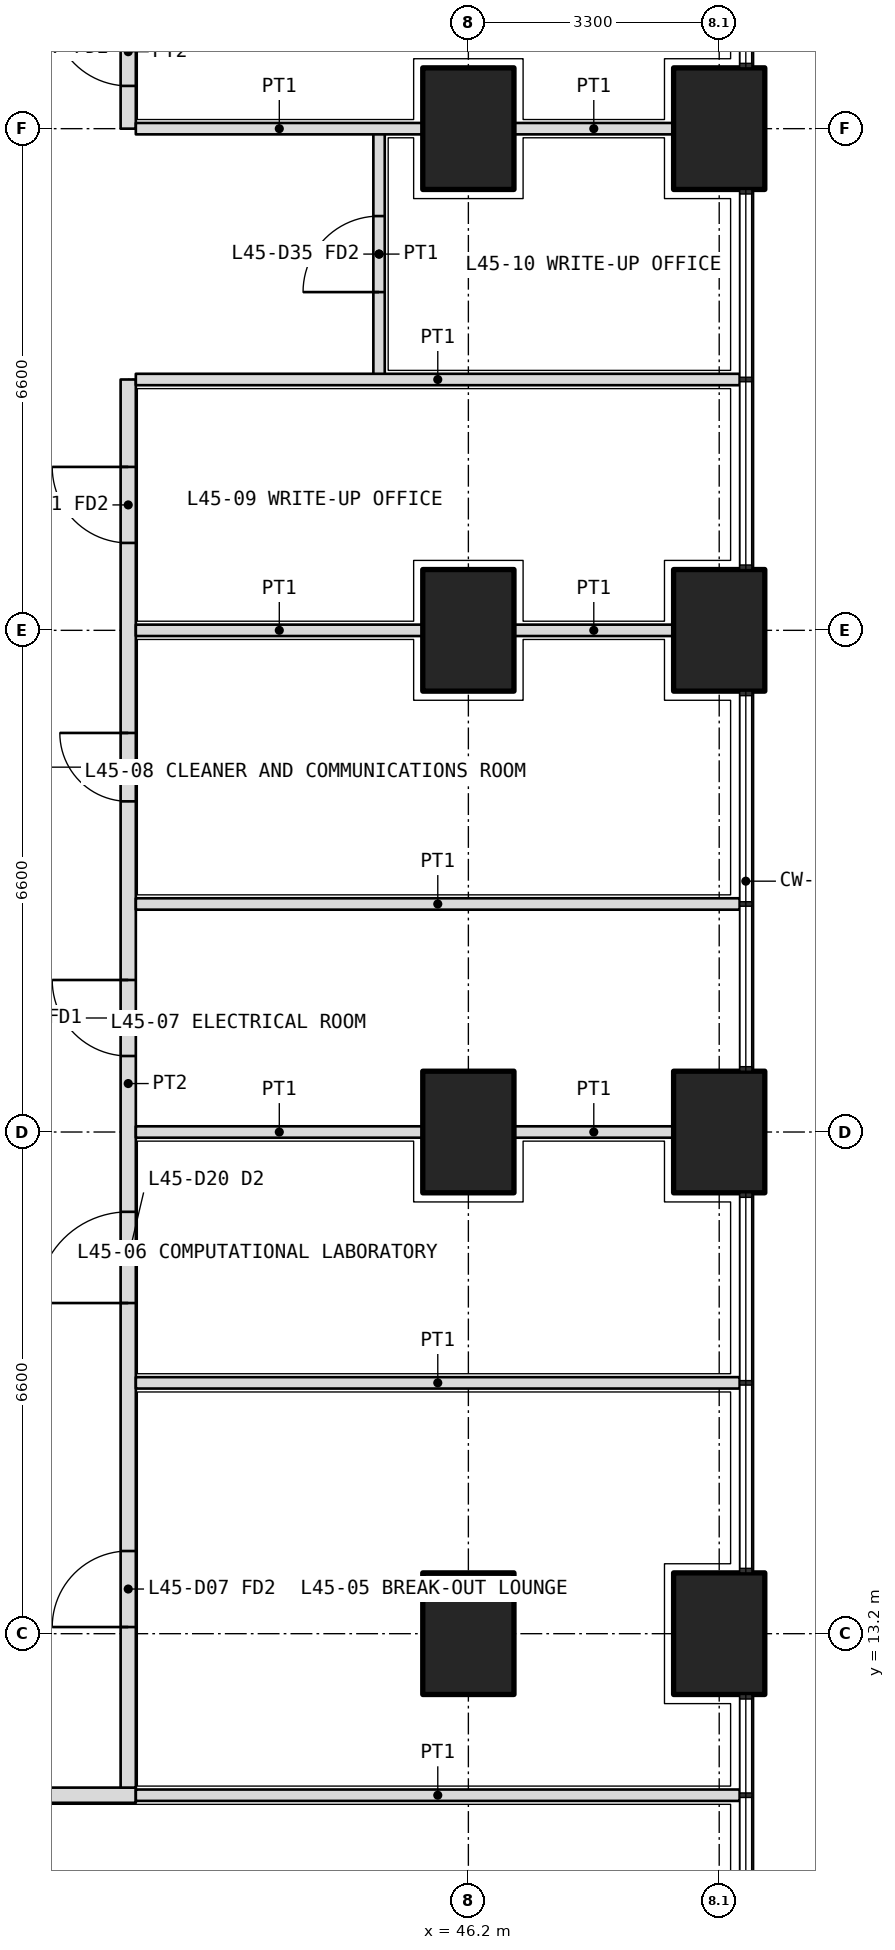
"""IFC4 building model, lengths in metres.
Left out: names, types, materials, properties, quantities, classifications, styles, units other than length and angle.
Written with IfcOpenShell. Run it as: python <this file> out.ifc"""

import sys

from ifc_helpers import new_model, si_unit, direction, frame, frame_2d, origin, origin_2d, place, context, subcontext, project, spatial, rectangle, extrude, element, fill, save


model = new_model("IFC4")
c1 = context("Model", 3, precision=1e-05, world=origin(), true_north=direction((0.0, 1.0)))
c2 = subcontext(c1, "Body", "Model", "MODEL_VIEW")
j1 = project(units=[si_unit("LENGTHUNIT", "METRE"), si_unit("PLANEANGLEUNIT", "RADIAN")], contexts=[c1])
p1 = place(None, origin())
s1 = spatial("IfcSite", under=j1, at=p1, CompositionType="ELEMENT")
p2 = place(p1, origin())
s2 = spatial("IfcBuilding", under=s1, at=p2, CompositionType="ELEMENT")
p3 = place(p2, frame((0.0, 0.0, 197.7)))
s3 = spatial("IfcBuildingStorey", under=s2, at=p3, CompositionType="ELEMENT", Elevation=197.7)
for number, where, z_axis, x_axis in (
    (1, (49.5, 13.2, 0.0), (0.0, 0.0, 1.0), (0.0, 1.0, 0.0)),
    (2, (49.5, 19.8, 0.0), (0.0, 0.0, 1.0), (0.0, 1.0, 0.0)),
    (3, (49.5, 26.4, 0.0), (0.0, 0.0, 1.0), (0.0, 1.0, 0.0)),
    (4, (49.5, 33.0, 0.0), (0.0, 0.0, 1.0), (0.0, 1.0, 0.0)),
    (5, (46.2, 13.2, 0.0), (0.0, 0.0, 1.0), (0.0, 1.0, 0.0)),
    (6, (46.2, 19.8, 0.0), (0.0, 0.0, 1.0), (0.0, 1.0, 0.0)),
    (7, (46.2, 26.4, 0.0), (0.0, 0.0, 1.0), (0.0, 1.0, 0.0)),
    (8, (46.2, 33.0, 0.0), (0.0, 0.0, 1.0), (0.0, 1.0, 0.0)),
):
    element("IfcColumn", number, at=place(p3, frame(where, z_axis=z_axis, x_axis=x_axis)), inside=s3, PredefinedType="COLUMN", context=c2, shape_type="SweptSolid", body=[
        extrude(rectangle(XDim=1.6, YDim=1.2, at=origin_2d()), origin(), (0.0, 0.0, 1.0), 4.2),
    ])
p4 = place(p3, frame((10.975, 11.075, 0.0), z_axis=(0.0, 0.0, 1.0), x_axis=(1.0, 0.0, 0.0)))
e9 = element("IfcWall", 9, at=p4, inside=s3, PredefinedType="PARTITIONING", context=c2, shape_type="SweptSolid", body=[
    extrude(rectangle(XDim=30.85, YDim=0.2, at=frame_2d((15.425, 0.0))), origin(), (0.0, 0.0, 1.0), 2.85),
])
p5 = place(p4, frame((5.512, 0.0, 0.0)))
e10 = element("IfcOpeningElement", 10, at=p5, cuts=e9, PredefinedType="OPENING", context=c2, shape_type="SweptSolid", body=[
    extrude(rectangle(XDim=1.2, YDim=2.1, at=frame_2d((0.6, 1.05))), frame((0.0, 0.11, 0.0), z_axis=(0.0, -1.0, 0.0), x_axis=(1.0, 0.0, 0.0)), (0.0, 0.0, 1.0), 0.22),
])
p6 = place(p4, frame((13.375, 0.0, 0.0)))
e11 = element("IfcOpeningElement", 11, at=p6, cuts=e9, PredefinedType="OPENING", context=c2, shape_type="SweptSolid", body=[
    extrude(rectangle(XDim=1.0, YDim=2.1, at=frame_2d((0.5, 1.05))), frame((0.0, 0.11, 0.0), z_axis=(0.0, -1.0, 0.0), x_axis=(1.0, 0.0, 0.0)), (0.0, 0.0, 1.0), 0.22),
])
p7 = place(p4, frame((16.675, 0.0, 0.0)))
e12 = element("IfcOpeningElement", 12, at=p7, cuts=e9, PredefinedType="OPENING", context=c2, shape_type="SweptSolid", body=[
    extrude(rectangle(XDim=1.0, YDim=2.1, at=frame_2d((0.5, 1.05))), frame((0.0, 0.11, 0.0), z_axis=(0.0, -1.0, 0.0), x_axis=(1.0, 0.0, 0.0)), (0.0, 0.0, 1.0), 0.22),
])
p8 = place(p4, frame((24.238, 0.0, 0.0)))
e13 = element("IfcOpeningElement", 13, at=p8, cuts=e9, PredefinedType="OPENING", context=c2, shape_type="SweptSolid", body=[
    extrude(rectangle(XDim=1.0, YDim=2.1, at=frame_2d((0.5, 1.05))), frame((0.0, 0.11, 0.0), z_axis=(0.0, -1.0, 0.0), x_axis=(1.0, 0.0, 0.0)), (0.0, 0.0, 1.0), 0.22),
])
p9 = place(p3, frame((41.725, 11.175, 0.0), z_axis=(0.0, 0.0, 1.0), x_axis=(0.0, 1.0, 0.0)))
e14 = element("IfcWall", 14, at=p9, inside=s3, PredefinedType="PARTITIONING", context=c2, shape_type="SweptSolid", body=[
    extrude(rectangle(XDim=18.525, YDim=0.2, at=frame_2d((9.262, 0.0))), origin(), (0.0, 0.0, 1.0), 2.85),
])
p10 = place(p9, frame((2.113, 0.0, 0.0)))
e15 = element("IfcOpeningElement", 15, at=p10, cuts=e14, PredefinedType="OPENING", context=c2, shape_type="SweptSolid", body=[
    extrude(rectangle(XDim=1.0, YDim=2.1, at=frame_2d((0.5, 1.05))), frame((0.0, 0.11, 0.0), z_axis=(0.0, -1.0, 0.0), x_axis=(1.0, 0.0, 0.0)), (0.0, 0.0, 1.0), 0.22),
])
p11 = place(p9, frame((6.375, 0.0, 0.0)))
e16 = element("IfcOpeningElement", 16, at=p11, cuts=e14, PredefinedType="OPENING", context=c2, shape_type="SweptSolid", body=[
    extrude(rectangle(XDim=1.2, YDim=2.1, at=frame_2d((0.6, 1.05))), frame((0.0, 0.11, 0.0), z_axis=(0.0, -1.0, 0.0), x_axis=(1.0, 0.0, 0.0)), (0.0, 0.0, 1.0), 0.22),
])
p12 = place(p9, frame((9.625, 0.0, 0.0)))
e17 = element("IfcOpeningElement", 17, at=p12, cuts=e14, PredefinedType="OPENING", context=c2, shape_type="SweptSolid", body=[
    extrude(rectangle(XDim=1.0, YDim=2.1, at=frame_2d((0.5, 1.05))), frame((0.0, 0.11, 0.0), z_axis=(0.0, -1.0, 0.0), x_axis=(1.0, 0.0, 0.0)), (0.0, 0.0, 1.0), 0.22),
])
p13 = place(p9, frame((12.975, 0.0, 0.0)))
e18 = element("IfcOpeningElement", 18, at=p13, cuts=e14, PredefinedType="OPENING", context=c2, shape_type="SweptSolid", body=[
    extrude(rectangle(XDim=0.9, YDim=2.1, at=frame_2d((0.45, 1.05))), frame((0.0, 0.11, 0.0), z_axis=(0.0, -1.0, 0.0), x_axis=(1.0, 0.0, 0.0)), (0.0, 0.0, 1.0), 0.22),
])
p14 = place(p9, frame((16.375, 0.0, 0.0)))
e19 = element("IfcOpeningElement", 19, at=p14, cuts=e14, PredefinedType="OPENING", context=c2, shape_type="SweptSolid", body=[
    extrude(rectangle(XDim=1.0, YDim=2.1, at=frame_2d((0.5, 1.05))), frame((0.0, 0.11, 0.0), z_axis=(0.0, -1.0, 0.0), x_axis=(1.0, 0.0, 0.0)), (0.0, 0.0, 1.0), 0.22),
])
p15 = place(p3, frame((41.725, 33.0, 0.0), z_axis=(0.0, 0.0, 1.0), x_axis=(0.0, 1.0, 0.0)))
e20 = element("IfcWall", 20, at=p15, inside=s3, PredefinedType="PARTITIONING", context=c2, shape_type="SweptSolid", body=[
    extrude(rectangle(XDim=2.025, YDim=0.2, at=frame_2d((1.012, 0.0))), origin(), (0.0, 0.0, 1.0), 2.85),
])
p16 = place(p15, frame((0.562, 0.0, 0.0)))
e21 = element("IfcOpeningElement", 21, at=p16, cuts=e20, PredefinedType="OPENING", context=c2, shape_type="SweptSolid", body=[
    extrude(rectangle(XDim=1.0, YDim=2.1, at=frame_2d((0.5, 1.05))), frame((0.0, 0.11, 0.0), z_axis=(0.0, -1.0, 0.0), x_axis=(1.0, 0.0, 0.0)), (0.0, 0.0, 1.0), 0.22),
])
for number, where, z_axis, x_axis in (
    (22, (49.77, 11.075, 0.0), (0.0, 0.0, 1.0), (-1.0, 0.0, 0.0)),
    (23, (49.77, 22.8, 0.0), (0.0, 0.0, 1.0), (-1.0, 0.0, 0.0)),
):
    element("IfcWall", number, at=place(p3, frame(where, z_axis=z_axis, x_axis=x_axis)), inside=s3, PredefinedType="PARTITIONING", context=c2, shape_type="SweptSolid", body=[
        extrude(rectangle(XDim=7.945, YDim=0.15, at=frame_2d((3.973, 0.0))), origin(), (0.0, 0.0, 1.0), 2.7),
    ])
p17 = place(p3, frame((48.9, 26.4, 0.0), z_axis=(0.0, 0.0, 1.0), x_axis=(-1.0, 0.0, 0.0)))
e24 = element("IfcWall", 24, at=p17, inside=s3, PredefinedType="PARTITIONING", context=c2, shape_type="SweptSolid", body=[
    extrude(rectangle(XDim=2.1, YDim=0.15, at=frame_2d((1.05, 0.0))), origin(), (0.0, 0.0, 1.0), 2.85),
])
p18 = place(p3, frame((45.6, 26.4, 0.0), z_axis=(0.0, 0.0, 1.0), x_axis=(-1.0, 0.0, 0.0)))
e25 = element("IfcWall", 25, at=p18, inside=s3, PredefinedType="PARTITIONING", context=c2, shape_type="SweptSolid", body=[
    extrude(rectangle(XDim=3.775, YDim=0.15, at=frame_2d((1.888, 0.0))), origin(), (0.0, 0.0, 1.0), 2.85),
])
p19 = place(p3, frame((45.025, 29.7, 0.0), z_axis=(0.0, 0.0, 1.0), x_axis=(0.0, 1.0, 0.0)))
e26 = element("IfcWall", 26, at=p19, inside=s3, PredefinedType="PARTITIONING", context=c2, shape_type="SweptSolid", body=[
    extrude(rectangle(XDim=3.3, YDim=0.15, at=frame_2d((1.65, 0.0))), origin(), (0.0, 0.0, 1.0), 2.85),
])
p20 = place(p19, frame((1.15, 0.0, 0.0)))
e27 = element("IfcOpeningElement", 27, at=p20, cuts=e26, PredefinedType="OPENING", context=c2, shape_type="SweptSolid", body=[
    extrude(rectangle(XDim=1.0, YDim=2.1, at=frame_2d((0.5, 1.05))), frame((0.0, 0.085, 0.0), z_axis=(0.0, -1.0, 0.0), x_axis=(1.0, 0.0, 0.0)), (0.0, 0.0, 1.0), 0.17),
])
p21 = place(p3, frame((49.77, 16.5, 0.0), z_axis=(0.0, 0.0, 1.0), x_axis=(-1.0, 0.0, 0.0)))
e28 = element("IfcWall", 28, at=p21, inside=s3, PredefinedType="PARTITIONING", context=c2, shape_type="SweptSolid", body=[
    extrude(rectangle(XDim=7.945, YDim=0.15, at=frame_2d((3.973, 0.0))), origin(), (0.0, 0.0, 1.0), 2.7),
])
p22 = place(p3, frame((48.9, 19.8, 0.0), z_axis=(0.0, 0.0, 1.0), x_axis=(-1.0, 0.0, 0.0)))
e29 = element("IfcWall", 29, at=p22, inside=s3, PredefinedType="PARTITIONING", context=c2, shape_type="SweptSolid", body=[
    extrude(rectangle(XDim=2.1, YDim=0.15, at=frame_2d((1.05, 0.0))), origin(), (0.0, 0.0, 1.0), 2.85),
])
p23 = place(p3, frame((45.6, 19.8, 0.0), z_axis=(0.0, 0.0, 1.0), x_axis=(-1.0, 0.0, 0.0)))
e30 = element("IfcWall", 30, at=p23, inside=s3, PredefinedType="PARTITIONING", context=c2, shape_type="SweptSolid", body=[
    extrude(rectangle(XDim=3.775, YDim=0.15, at=frame_2d((1.888, 0.0))), origin(), (0.0, 0.0, 1.0), 2.85),
])
p24 = place(p3, frame((49.77, 29.7, 0.0), z_axis=(0.0, 0.0, 1.0), x_axis=(-1.0, 0.0, 0.0)))
e31 = element("IfcWall", 31, at=p24, inside=s3, PredefinedType="PARTITIONING", context=c2, shape_type="SweptSolid", body=[
    extrude(rectangle(XDim=7.945, YDim=0.15, at=frame_2d((3.973, 0.0))), origin(), (0.0, 0.0, 1.0), 2.7),
])
p25 = place(p3, frame((48.9, 33.0, 0.0), z_axis=(0.0, 0.0, 1.0), x_axis=(-1.0, 0.0, 0.0)))
e32 = element("IfcWall", 32, at=p25, inside=s3, PredefinedType="PARTITIONING", context=c2, shape_type="SweptSolid", body=[
    extrude(rectangle(XDim=2.1, YDim=0.15, at=frame_2d((1.05, 0.0))), origin(), (0.0, 0.0, 1.0), 2.85),
])
p26 = place(p3, frame((45.6, 33.0, 0.0), z_axis=(0.0, 0.0, 1.0), x_axis=(-1.0, 0.0, 0.0)))
e33 = element("IfcWall", 33, at=p26, inside=s3, PredefinedType="PARTITIONING", context=c2, shape_type="SweptSolid", body=[
    extrude(rectangle(XDim=3.775, YDim=0.15, at=frame_2d((1.888, 0.0))), origin(), (0.0, 0.0, 1.0), 2.85),
])
p27 = place(p10, origin())
e34 = element("IfcDoor", 34, at=p27, inside=s3, OperationType="SINGLE_SWING_LEFT", PredefinedType="DOOR", context=c2, shape_type="SweptSolid", body=[
    extrude(rectangle(XDim=1.0, YDim=2.1, at=frame_2d((0.5, 1.05))), frame((0.0, 0.025, 0.0), z_axis=(0.0, -1.0, 0.0), x_axis=(1.0, 0.0, 0.0)), (0.0, 0.0, 1.0), 0.05),
])
fill(e15, e34)
p28 = place(p11, origin())
e35 = element("IfcDoor", 35, at=p28, inside=s3, OperationType="DOUBLE_DOOR_SINGLE_SWING", PredefinedType="DOOR", context=c2, shape_type="SweptSolid", body=[
    extrude(rectangle(XDim=1.2, YDim=2.1, at=frame_2d((0.6, 1.05))), frame((0.0, 0.025, 0.0), z_axis=(0.0, -1.0, 0.0), x_axis=(1.0, 0.0, 0.0)), (0.0, 0.0, 1.0), 0.05),
])
fill(e16, e35)
p29 = place(p12, origin())
e36 = element("IfcDoor", 36, at=p29, inside=s3, OperationType="SINGLE_SWING_RIGHT", PredefinedType="DOOR", context=c2, shape_type="SweptSolid", body=[
    extrude(rectangle(XDim=1.0, YDim=2.1, at=frame_2d((0.5, 1.05))), frame((0.0, 0.025, 0.0), z_axis=(0.0, -1.0, 0.0), x_axis=(1.0, 0.0, 0.0)), (0.0, 0.0, 1.0), 0.05),
])
fill(e17, e36)
p30 = place(p13, origin())
e37 = element("IfcDoor", 37, at=p30, inside=s3, OperationType="SINGLE_SWING_RIGHT", PredefinedType="DOOR", context=c2, shape_type="SweptSolid", body=[
    extrude(rectangle(XDim=0.9, YDim=2.1, at=frame_2d((0.45, 1.05))), frame((0.0, 0.025, 0.0), z_axis=(0.0, -1.0, 0.0), x_axis=(1.0, 0.0, 0.0)), (0.0, 0.0, 1.0), 0.05),
])
fill(e18, e37)
p31 = place(p14, origin())
e38 = element("IfcDoor", 38, at=p31, inside=s3, OperationType="SINGLE_SWING_RIGHT", PredefinedType="DOOR", context=c2, shape_type="SweptSolid", body=[
    extrude(rectangle(XDim=1.0, YDim=2.1, at=frame_2d((0.5, 1.05))), frame((0.0, 0.025, 0.0), z_axis=(0.0, -1.0, 0.0), x_axis=(1.0, 0.0, 0.0)), (0.0, 0.0, 1.0), 0.05),
])
fill(e19, e38)
p32 = place(p20, origin())
e39 = element("IfcDoor", 39, at=p32, inside=s3, OperationType="SINGLE_SWING_LEFT", PredefinedType="DOOR", context=c2, shape_type="SweptSolid", body=[
    extrude(rectangle(XDim=1.0, YDim=2.1, at=frame_2d((0.5, 1.05))), frame((0.0, 0.025, 0.0), z_axis=(0.0, -1.0, 0.0), x_axis=(1.0, 0.0, 0.0)), (0.0, 0.0, 1.0), 0.05),
])
fill(e27, e39)
p33 = place(p16, origin())
e40 = element("IfcDoor", 40, at=p33, inside=s3, OperationType="SINGLE_SWING_RIGHT", PredefinedType="DOOR", context=c2, shape_type="SweptSolid", body=[
    extrude(rectangle(XDim=1.0, YDim=2.1, at=frame_2d((0.5, 1.05))), frame((0.0, 0.025, 0.0), z_axis=(0.0, -1.0, 0.0), x_axis=(1.0, 0.0, 0.0)), (0.0, 0.0, 1.0), 0.05),
])
fill(e21, e40)
save(model, sys.argv[1])
